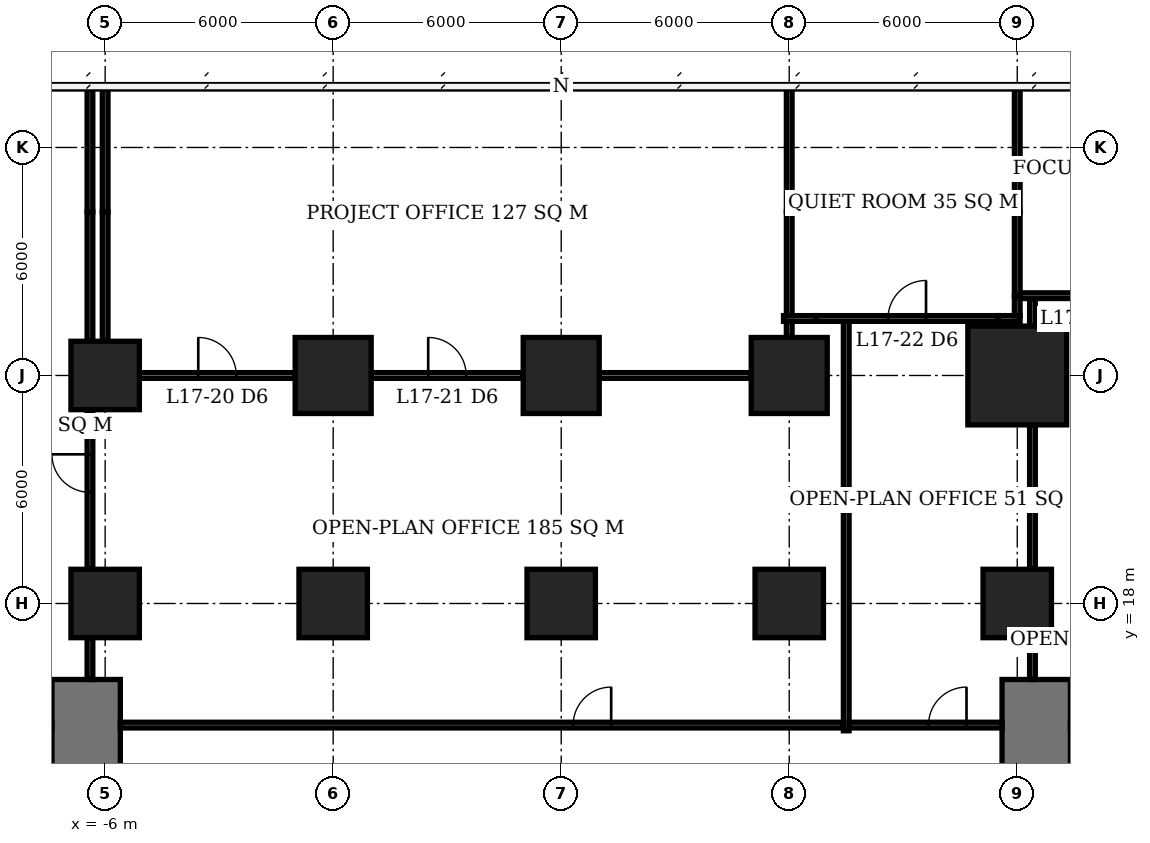
"""IFC4 building model, lengths in metres.
Left out: names, types, materials, properties, quantities, classifications, styles, units other than length and angle.
Written with IfcOpenShell. Run it as: python <this file> out.ifc"""

import sys

from ifc_helpers import new_model, si_unit, direction, frame, frame_2d, origin, origin_2d, place, context, subcontext, project, spatial, rectangle, extrude, element, fill, save


model = new_model("IFC4")
c1 = context("Model", 3, precision=1e-05, world=origin(), true_north=direction((0.0, 1.0)))
c2 = subcontext(c1, "Body", "Model", "MODEL_VIEW")
j1 = project(units=[si_unit("LENGTHUNIT", "METRE"), si_unit("PLANEANGLEUNIT", "RADIAN")], contexts=[c1])
p1 = place(None, origin())
s1 = spatial("IfcSite", under=j1, at=p1, CompositionType="ELEMENT")
p2 = place(p1, origin())
s2 = spatial("IfcBuilding", under=s1, at=p2, CompositionType="ELEMENT")
p3 = place(p2, frame((0.0, 0.0, 72.8)))
s3 = spatial("IfcBuildingStorey", under=s2, at=p3, CompositionType="ELEMENT", Elevation=72.8)
for number, where, z_axis, x_axis in (
    (1, (-6.0, 18.0, 0.0), (0.0, 0.0, 1.0), (1.0, 0.0, 0.0)),
    (2, (-6.0, 24.0, 0.0), (0.0, 0.0, 1.0), (1.0, 0.0, 0.0)),
    (3, (0.0, 18.0, 0.0), (0.0, 0.0, 1.0), (1.0, 0.0, 0.0)),
):
    element("IfcColumn", number, at=place(p3, frame(where, z_axis=z_axis, x_axis=x_axis)), inside=s3, PredefinedType="COLUMN", context=c2, shape_type="SweptSolid", body=[
        extrude(rectangle(XDim=1.8, YDim=1.8, at=origin_2d()), origin(), (0.0, 0.0, 1.0), 3.9),
    ])
p4 = place(p3, frame((0.0, 24.0, 0.0), z_axis=(0.0, 0.0, 1.0), x_axis=(1.0, 0.0, 0.0)))
e4 = element("IfcColumn", 4, at=p4, inside=s3, PredefinedType="COLUMN", context=c2, shape_type="SweptSolid", body=[
    extrude(rectangle(XDim=2.0, YDim=2.0, at=origin_2d()), origin(), (0.0, 0.0, 1.0), 3.9),
])
p5 = place(p3, frame((6.0, 18.0, 0.0), z_axis=(0.0, 0.0, 1.0), x_axis=(1.0, 0.0, 0.0)))
e5 = element("IfcColumn", 5, at=p5, inside=s3, PredefinedType="COLUMN", context=c2, shape_type="SweptSolid", body=[
    extrude(rectangle(XDim=1.8, YDim=1.8, at=origin_2d()), origin(), (0.0, 0.0, 1.0), 3.9),
])
p6 = place(p3, frame((6.0, 24.0, 0.0), z_axis=(0.0, 0.0, 1.0), x_axis=(1.0, 0.0, 0.0)))
e6 = element("IfcColumn", 6, at=p6, inside=s3, PredefinedType="COLUMN", context=c2, shape_type="SweptSolid", body=[
    extrude(rectangle(XDim=2.0, YDim=2.0, at=origin_2d()), origin(), (0.0, 0.0, 1.0), 3.9),
])
p7 = place(p3, frame((12.0, 18.0, 0.0), z_axis=(0.0, 0.0, 1.0), x_axis=(1.0, 0.0, 0.0)))
e7 = element("IfcColumn", 7, at=p7, inside=s3, PredefinedType="COLUMN", context=c2, shape_type="SweptSolid", body=[
    extrude(rectangle(XDim=1.8, YDim=1.8, at=origin_2d()), origin(), (0.0, 0.0, 1.0), 3.9),
])
p8 = place(p3, frame((12.0, 24.0, 0.0), z_axis=(0.0, 0.0, 1.0), x_axis=(1.0, 0.0, 0.0)))
e8 = element("IfcColumn", 8, at=p8, inside=s3, PredefinedType="COLUMN", context=c2, shape_type="SweptSolid", body=[
    extrude(rectangle(XDim=2.0, YDim=2.0, at=origin_2d()), origin(), (0.0, 0.0, 1.0), 3.9),
])
p9 = place(p3, frame((18.0, 18.0, 0.0), z_axis=(0.0, 0.0, 1.0), x_axis=(1.0, 0.0, 0.0)))
e9 = element("IfcColumn", 9, at=p9, inside=s3, PredefinedType="COLUMN", context=c2, shape_type="SweptSolid", body=[
    extrude(rectangle(XDim=1.8, YDim=1.8, at=origin_2d()), origin(), (0.0, 0.0, 1.0), 3.9),
])
p10 = place(p3, frame((18.0, 24.0, 0.0), z_axis=(0.0, 0.0, 1.0), x_axis=(1.0, 0.0, 0.0)))
e10 = element("IfcColumn", 10, at=p10, inside=s3, PredefinedType="COLUMN", context=c2, shape_type="SweptSolid", body=[
    extrude(rectangle(XDim=2.6, YDim=2.6, at=origin_2d()), origin(), (0.0, 0.0, 1.0), 3.9),
])
for number, where, z_axis, x_axis in (
    (11, (-6.5, 13.6, 0.0), (0.0, 0.0, 1.0), (0.0, 1.0, 0.0)),
    (12, (18.5, 13.6, 0.0), (0.0, 0.0, 1.0), (0.0, 1.0, 0.0)),
):
    element("IfcWall", number, at=place(p3, frame(where, z_axis=z_axis, x_axis=x_axis)), inside=s3, PredefinedType="SHEAR", context=c2, shape_type="SweptSolid", body=[
        extrude(rectangle(XDim=2.4, YDim=1.8, at=frame_2d((1.2, 0.0))), origin(), (0.0, 0.0, 1.0), 3.9),
    ])
p11 = place(p3, frame((-5.1, 24.0, 0.0), z_axis=(0.0, 0.0, 1.0), x_axis=(1.0, 0.0, 0.0)))
e13 = element("IfcWall", 13, at=p11, inside=s3, PredefinedType="PARTITIONING", context=c2, shape_type="SweptSolid", body=[
    extrude(rectangle(XDim=4.1, YDim=0.15, at=frame_2d((2.05, 0.0))), origin(), (0.0, 0.0, 1.0), 3.65),
])
p12 = place(p11, frame((1.55, 0.0, 0.0)))
e14 = element("IfcOpeningElement", 14, at=p12, cuts=e13, PredefinedType="OPENING", context=c2, shape_type="SweptSolid", body=[
    extrude(rectangle(XDim=1.0, YDim=2.1, at=frame_2d((0.5, 1.05))), frame((0.0, 0.085, 0.0), z_axis=(0.0, -1.0, 0.0), x_axis=(1.0, 0.0, 0.0)), (0.0, 0.0, 1.0), 0.17),
])
p13 = place(p3, frame((1.0, 24.0, 0.0), z_axis=(0.0, 0.0, 1.0), x_axis=(1.0, 0.0, 0.0)))
e15 = element("IfcWall", 15, at=p13, inside=s3, PredefinedType="PARTITIONING", context=c2, shape_type="SweptSolid", body=[
    extrude(rectangle(XDim=4.0, YDim=0.15, at=frame_2d((2.0, 0.0))), origin(), (0.0, 0.0, 1.0), 3.65),
])
p14 = place(p13, frame((1.5, 0.0, 0.0)))
e16 = element("IfcOpeningElement", 16, at=p14, cuts=e15, PredefinedType="OPENING", context=c2, shape_type="SweptSolid", body=[
    extrude(rectangle(XDim=1.0, YDim=2.1, at=frame_2d((0.5, 1.05))), frame((0.0, 0.085, 0.0), z_axis=(0.0, -1.0, 0.0), x_axis=(1.0, 0.0, 0.0)), (0.0, 0.0, 1.0), 0.17),
])
p15 = place(p3, frame((7.0, 24.0, 0.0), z_axis=(0.0, 0.0, 1.0), x_axis=(1.0, 0.0, 0.0)))
e17 = element("IfcWall", 17, at=p15, inside=s3, PredefinedType="PARTITIONING", context=c2, shape_type="SweptSolid", body=[
    extrude(rectangle(XDim=4.0, YDim=0.15, at=frame_2d((2.0, 0.0))), origin(), (0.0, 0.0, 1.0), 3.65),
])
p16 = place(p3, frame((11.85, 25.5, 0.0), z_axis=(0.0, 0.0, 1.0), x_axis=(1.0, 0.0, 0.0)))
e18 = element("IfcWall", 18, at=p16, inside=s3, PredefinedType="PARTITIONING", context=c2, shape_type="SweptSolid", body=[
    extrude(rectangle(XDim=0.86, YDim=0.15, at=frame_2d((0.43, 0.0))), origin(), (0.0, 0.0, 1.0), 2.65),
])
p17 = place(p3, frame((12.71, 25.5, 0.0), z_axis=(0.0, 0.0, 1.0), x_axis=(1.0, 0.0, 0.0)))
e19 = element("IfcWall", 19, at=p17, inside=s3, PredefinedType="PARTITIONING", context=c2, shape_type="SweptSolid", body=[
    extrude(rectangle(XDim=4.78, YDim=0.15, at=frame_2d((2.39, 0.0))), origin(), (0.0, 0.0, 1.0), 3.65),
])
p18 = place(p17, frame((1.89, 0.0, 0.0)))
e20 = element("IfcOpeningElement", 20, at=p18, cuts=e19, PredefinedType="OPENING", context=c2, shape_type="SweptSolid", body=[
    extrude(rectangle(XDim=1.0, YDim=2.1, at=frame_2d((0.5, 1.05))), frame((0.0, 0.085, 0.0), z_axis=(0.0, -1.0, 0.0), x_axis=(1.0, 0.0, 0.0)), (0.0, 0.0, 1.0), 0.17),
])
p19 = place(p3, frame((17.49, 25.5, 0.0), z_axis=(0.0, 0.0, 1.0), x_axis=(1.0, 0.0, 0.0)))
e21 = element("IfcWall", 21, at=p19, inside=s3, PredefinedType="PARTITIONING", context=c2, shape_type="SweptSolid", body=[
    extrude(rectangle(XDim=0.585, YDim=0.15, at=frame_2d((0.292, 0.0))), origin(), (0.0, 0.0, 1.0), 2.65),
])
p20 = place(p3, frame((18.075, 26.1, 0.0), z_axis=(0.0, 0.0, 1.0), x_axis=(1.0, 0.0, 0.0)))
e22 = element("IfcWall", 22, at=p20, inside=s3, PredefinedType="PARTITIONING", context=c2, shape_type="SweptSolid", body=[
    extrude(rectangle(XDim=3.817, YDim=0.15, at=frame_2d((1.909, 0.0))), origin(), (0.0, 0.0, 1.0), 2.65),
])
p21 = place(p20, frame((1.371, 0.0, 0.0)))
e23 = element("IfcOpeningElement", 23, at=p21, cuts=e22, PredefinedType="OPENING", context=c2, shape_type="SweptSolid", body=[
    extrude(rectangle(XDim=1.0, YDim=2.1, at=frame_2d((0.5, 1.05))), frame((0.0, 0.085, 0.0), z_axis=(0.0, -1.0, 0.0), x_axis=(1.0, 0.0, 0.0)), (0.0, 0.0, 1.0), 0.17),
])
p22 = place(p3, frame((-6.0, 24.9, 0.0), z_axis=(0.0, 0.0, 1.0), x_axis=(0.0, 1.0, 0.0)))
e24 = element("IfcWall", 24, at=p22, inside=s3, PredefinedType="PARTITIONING", context=c2, shape_type="SweptSolid", body=[
    extrude(rectangle(XDim=3.41, YDim=0.15, at=frame_2d((1.705, 0.0))), origin(), (0.0, 0.0, 1.0), 2.65),
])
p23 = place(p3, frame((-6.0, 28.31, 0.0), z_axis=(0.0, 0.0, 1.0), x_axis=(0.0, 1.0, 0.0)))
e25 = element("IfcWall", 25, at=p23, inside=s3, PredefinedType="PARTITIONING", context=c2, shape_type="SweptSolid", body=[
    extrude(rectangle(XDim=3.29, YDim=0.15, at=frame_2d((1.645, 0.0))), origin(), (0.0, 0.0, 1.0), 3.65),
])
p24 = place(p3, frame((12.0, 25.0, 0.0), z_axis=(0.0, 0.0, 1.0), x_axis=(0.0, 1.0, 0.0)))
e26 = element("IfcWall", 26, at=p24, inside=s3, PredefinedType="PARTITIONING", context=c2, shape_type="SweptSolid", body=[
    extrude(rectangle(XDim=0.425, YDim=0.15, at=frame_2d((0.212, 0.0))), origin(), (0.0, 0.0, 1.0), 2.65),
])
p25 = place(p3, frame((12.0, 25.575, 0.0), z_axis=(0.0, 0.0, 1.0), x_axis=(0.0, 1.0, 0.0)))
e27 = element("IfcWall", 27, at=p25, inside=s3, PredefinedType="PARTITIONING", context=c2, shape_type="SweptSolid", body=[
    extrude(rectangle(XDim=2.735, YDim=0.15, at=frame_2d((1.368, 0.0))), origin(), (0.0, 0.0, 1.0), 2.65),
])
p26 = place(p3, frame((12.0, 28.31, 0.0), z_axis=(0.0, 0.0, 1.0), x_axis=(0.0, 1.0, 0.0)))
e28 = element("IfcWall", 28, at=p26, inside=s3, PredefinedType="PARTITIONING", context=c2, shape_type="SweptSolid", body=[
    extrude(rectangle(XDim=3.29, YDim=0.15, at=frame_2d((1.645, 0.0))), origin(), (0.0, 0.0, 1.0), 3.65),
])
p27 = place(p3, frame((18.0, 25.575, 0.0), z_axis=(0.0, 0.0, 1.0), x_axis=(0.0, 1.0, 0.0)))
e29 = element("IfcWall", 29, at=p27, inside=s3, PredefinedType="PARTITIONING", context=c2, shape_type="SweptSolid", body=[
    extrude(rectangle(XDim=0.525, YDim=0.15, at=frame_2d((0.263, 0.0))), origin(), (0.0, 0.0, 1.0), 2.65),
])
p28 = place(p3, frame((18.0, 26.1, 0.0), z_axis=(0.0, 0.0, 1.0), x_axis=(0.0, 1.0, 0.0)))
e30 = element("IfcWall", 30, at=p28, inside=s3, PredefinedType="PARTITIONING", context=c2, shape_type="SweptSolid", body=[
    extrude(rectangle(XDim=2.21, YDim=0.15, at=frame_2d((1.105, 0.0))), origin(), (0.0, 0.0, 1.0), 2.65),
])
p29 = place(p3, frame((18.0, 28.31, 0.0), z_axis=(0.0, 0.0, 1.0), x_axis=(0.0, 1.0, 0.0)))
e31 = element("IfcWall", 31, at=p29, inside=s3, PredefinedType="PARTITIONING", context=c2, shape_type="SweptSolid", body=[
    extrude(rectangle(XDim=3.29, YDim=0.15, at=frame_2d((1.645, 0.0))), origin(), (0.0, 0.0, 1.0), 3.65),
])
p30 = place(p3, frame((-6.4, 16.0, 0.0), z_axis=(0.0, 0.0, 1.0), x_axis=(0.0, 1.0, 0.0)))
e32 = element("IfcWall", 32, at=p30, inside=s3, PredefinedType="PARTITIONING", context=c2, shape_type="SweptSolid", body=[
    extrude(rectangle(XDim=1.1, YDim=0.15, at=frame_2d((0.55, 0.0))), origin(), (0.0, 0.0, 1.0), 3.65),
])
p31 = place(p3, frame((-6.4, 18.9, 0.0), z_axis=(0.0, 0.0, 1.0), x_axis=(0.0, 1.0, 0.0)))
e33 = element("IfcWall", 33, at=p31, inside=s3, PredefinedType="PARTITIONING", context=c2, shape_type="SweptSolid", body=[
    extrude(rectangle(XDim=4.2, YDim=0.15, at=frame_2d((2.1, 0.0))), origin(), (0.0, 0.0, 1.0), 3.65),
])
p32 = place(p31, frame((2.025, 0.0, 0.0)))
e34 = element("IfcOpeningElement", 34, at=p32, cuts=e33, PredefinedType="OPENING", context=c2, shape_type="SweptSolid", body=[
    extrude(rectangle(XDim=1.0, YDim=2.1, at=frame_2d((0.5, 1.05))), frame((0.0, 0.085, 0.0), z_axis=(0.0, -1.0, 0.0), x_axis=(1.0, 0.0, 0.0)), (0.0, 0.0, 1.0), 0.17),
])
p33 = place(p3, frame((-6.4, 24.9, 0.0), z_axis=(0.0, 0.0, 1.0), x_axis=(0.0, 1.0, 0.0)))
e35 = element("IfcWall", 35, at=p33, inside=s3, PredefinedType="PARTITIONING", context=c2, shape_type="SweptSolid", body=[
    extrude(rectangle(XDim=3.41, YDim=0.15, at=frame_2d((1.705, 0.0))), origin(), (0.0, 0.0, 1.0), 2.65),
])
p34 = place(p3, frame((-6.4, 28.31, 0.0), z_axis=(0.0, 0.0, 1.0), x_axis=(0.0, 1.0, 0.0)))
e36 = element("IfcWall", 36, at=p34, inside=s3, PredefinedType="PARTITIONING", context=c2, shape_type="SweptSolid", body=[
    extrude(rectangle(XDim=3.24, YDim=0.15, at=frame_2d((1.62, 0.0))), origin(), (0.0, 0.0, 1.0), 3.65),
])
p35 = place(p3, frame((-5.6, 14.8, 0.0), z_axis=(0.0, 0.0, 1.0), x_axis=(1.0, 0.0, 0.0)))
e37 = element("IfcWall", 37, at=p35, inside=s3, PredefinedType="PARTITIONING", context=c2, shape_type="SweptSolid", body=[
    extrude(rectangle(XDim=19.025, YDim=0.15, at=frame_2d((9.513, 0.0))), origin(), (0.0, 0.0, 1.0), 3.65),
])
p36 = place(p35, frame((11.915, 0.0, 0.0)))
e38 = element("IfcOpeningElement", 38, at=p36, cuts=e37, PredefinedType="OPENING", context=c2, shape_type="SweptSolid", body=[
    extrude(rectangle(XDim=1.0, YDim=2.1, at=frame_2d((0.5, 1.05))), frame((0.0, 0.085, 0.0), z_axis=(0.0, -1.0, 0.0), x_axis=(1.0, 0.0, 0.0)), (0.0, 0.0, 1.0), 0.17),
])
p37 = place(p3, frame((13.5, 14.65, 0.0), z_axis=(0.0, 0.0, 1.0), x_axis=(0.0, 1.0, 0.0)))
e39 = element("IfcWall", 39, at=p37, inside=s3, PredefinedType="PARTITIONING", context=c2, shape_type="SweptSolid", body=[
    extrude(rectangle(XDim=10.775, YDim=0.15, at=frame_2d((5.388, 0.0))), origin(), (0.0, 0.0, 1.0), 3.65),
])
p38 = place(p3, frame((13.575, 14.8, 0.0), z_axis=(0.0, 0.0, 1.0), x_axis=(1.0, 0.0, 0.0)))
e40 = element("IfcWall", 40, at=p38, inside=s3, PredefinedType="PARTITIONING", context=c2, shape_type="SweptSolid", body=[
    extrude(rectangle(XDim=4.025, YDim=0.15, at=frame_2d((2.013, 0.0))), origin(), (0.0, 0.0, 1.0), 3.65),
])
p39 = place(p38, frame((2.09, 0.0, 0.0)))
e41 = element("IfcOpeningElement", 41, at=p39, cuts=e40, PredefinedType="OPENING", context=c2, shape_type="SweptSolid", body=[
    extrude(rectangle(XDim=1.0, YDim=2.1, at=frame_2d((0.5, 1.05))), frame((0.0, 0.085, 0.0), z_axis=(0.0, -1.0, 0.0), x_axis=(1.0, 0.0, 0.0)), (0.0, 0.0, 1.0), 0.17),
])
p40 = place(p3, frame((18.4, 16.0, 0.0), z_axis=(0.0, 0.0, 1.0), x_axis=(0.0, 1.0, 0.0)))
e42 = element("IfcWall", 42, at=p40, inside=s3, PredefinedType="PARTITIONING", context=c2, shape_type="SweptSolid", body=[
    extrude(rectangle(XDim=1.1, YDim=0.15, at=frame_2d((0.55, 0.0))), origin(), (0.0, 0.0, 1.0), 3.65),
])
p41 = place(p3, frame((18.4, 18.9, 0.0), z_axis=(0.0, 0.0, 1.0), x_axis=(0.0, 1.0, 0.0)))
e43 = element("IfcWall", 43, at=p41, inside=s3, PredefinedType="PARTITIONING", context=c2, shape_type="SweptSolid", body=[
    extrude(rectangle(XDim=3.8, YDim=0.15, at=frame_2d((1.9, 0.0))), origin(), (0.0, 0.0, 1.0), 3.65),
])
p42 = place(p3, frame((18.4, 25.3, 0.0), z_axis=(0.0, 0.0, 1.0), x_axis=(0.0, 1.0, 0.0)))
e44 = element("IfcWall", 44, at=p42, inside=s3, PredefinedType="PARTITIONING", context=c2, shape_type="SweptSolid", body=[
    extrude(rectangle(XDim=0.725, YDim=0.15, at=frame_2d((0.362, 0.0))), origin(), (0.0, 0.0, 1.0), 2.65),
])
p43 = place(p12, origin())
e45 = element("IfcDoor", 45, at=p43, inside=s3, OperationType="SINGLE_SWING_LEFT", PredefinedType="DOOR", context=c2, shape_type="SweptSolid", body=[
    extrude(rectangle(XDim=1.0, YDim=2.1, at=frame_2d((0.5, 1.05))), frame((0.0, 0.025, 0.0), z_axis=(0.0, -1.0, 0.0), x_axis=(1.0, 0.0, 0.0)), (0.0, 0.0, 1.0), 0.05),
])
fill(e14, e45)
p44 = place(p14, origin())
e46 = element("IfcDoor", 46, at=p44, inside=s3, OperationType="SINGLE_SWING_LEFT", PredefinedType="DOOR", context=c2, shape_type="SweptSolid", body=[
    extrude(rectangle(XDim=1.0, YDim=2.1, at=frame_2d((0.5, 1.05))), frame((0.0, 0.025, 0.0), z_axis=(0.0, -1.0, 0.0), x_axis=(1.0, 0.0, 0.0)), (0.0, 0.0, 1.0), 0.05),
])
fill(e16, e46)
p45 = place(p18, origin())
e47 = element("IfcDoor", 47, at=p45, inside=s3, OperationType="SINGLE_SWING_RIGHT", PredefinedType="DOOR", context=c2, shape_type="SweptSolid", body=[
    extrude(rectangle(XDim=1.0, YDim=2.1, at=frame_2d((0.5, 1.05))), frame((0.0, 0.025, 0.0), z_axis=(0.0, -1.0, 0.0), x_axis=(1.0, 0.0, 0.0)), (0.0, 0.0, 1.0), 0.05),
])
fill(e20, e47)
p46 = place(p36, origin())
e48 = element("IfcDoor", 48, at=p46, inside=s3, OperationType="SINGLE_SWING_RIGHT", PredefinedType="DOOR", context=c2, shape_type="SweptSolid", body=[
    extrude(rectangle(XDim=1.0, YDim=2.1, at=frame_2d((0.5, 1.05))), frame((0.0, 0.025, 0.0), z_axis=(0.0, -1.0, 0.0), x_axis=(1.0, 0.0, 0.0)), (0.0, 0.0, 1.0), 0.05),
])
fill(e38, e48)
p47 = place(p39, origin())
e49 = element("IfcDoor", 49, at=p47, inside=s3, OperationType="SINGLE_SWING_RIGHT", PredefinedType="DOOR", context=c2, shape_type="SweptSolid", body=[
    extrude(rectangle(XDim=1.0, YDim=2.1, at=frame_2d((0.5, 1.05))), frame((0.0, 0.025, 0.0), z_axis=(0.0, -1.0, 0.0), x_axis=(1.0, 0.0, 0.0)), (0.0, 0.0, 1.0), 0.05),
])
fill(e41, e49)
p48 = place(p32, origin())
e50 = element("IfcDoor", 50, at=p48, inside=s3, OperationType="SINGLE_SWING_RIGHT", PredefinedType="DOOR", context=c2, shape_type="SweptSolid", body=[
    extrude(rectangle(XDim=1.0, YDim=2.1, at=frame_2d((0.5, 1.05))), frame((0.0, 0.025, 0.0), z_axis=(0.0, -1.0, 0.0), x_axis=(1.0, 0.0, 0.0)), (0.0, 0.0, 1.0), 0.05),
])
fill(e34, e50)
save(model, sys.argv[1])
